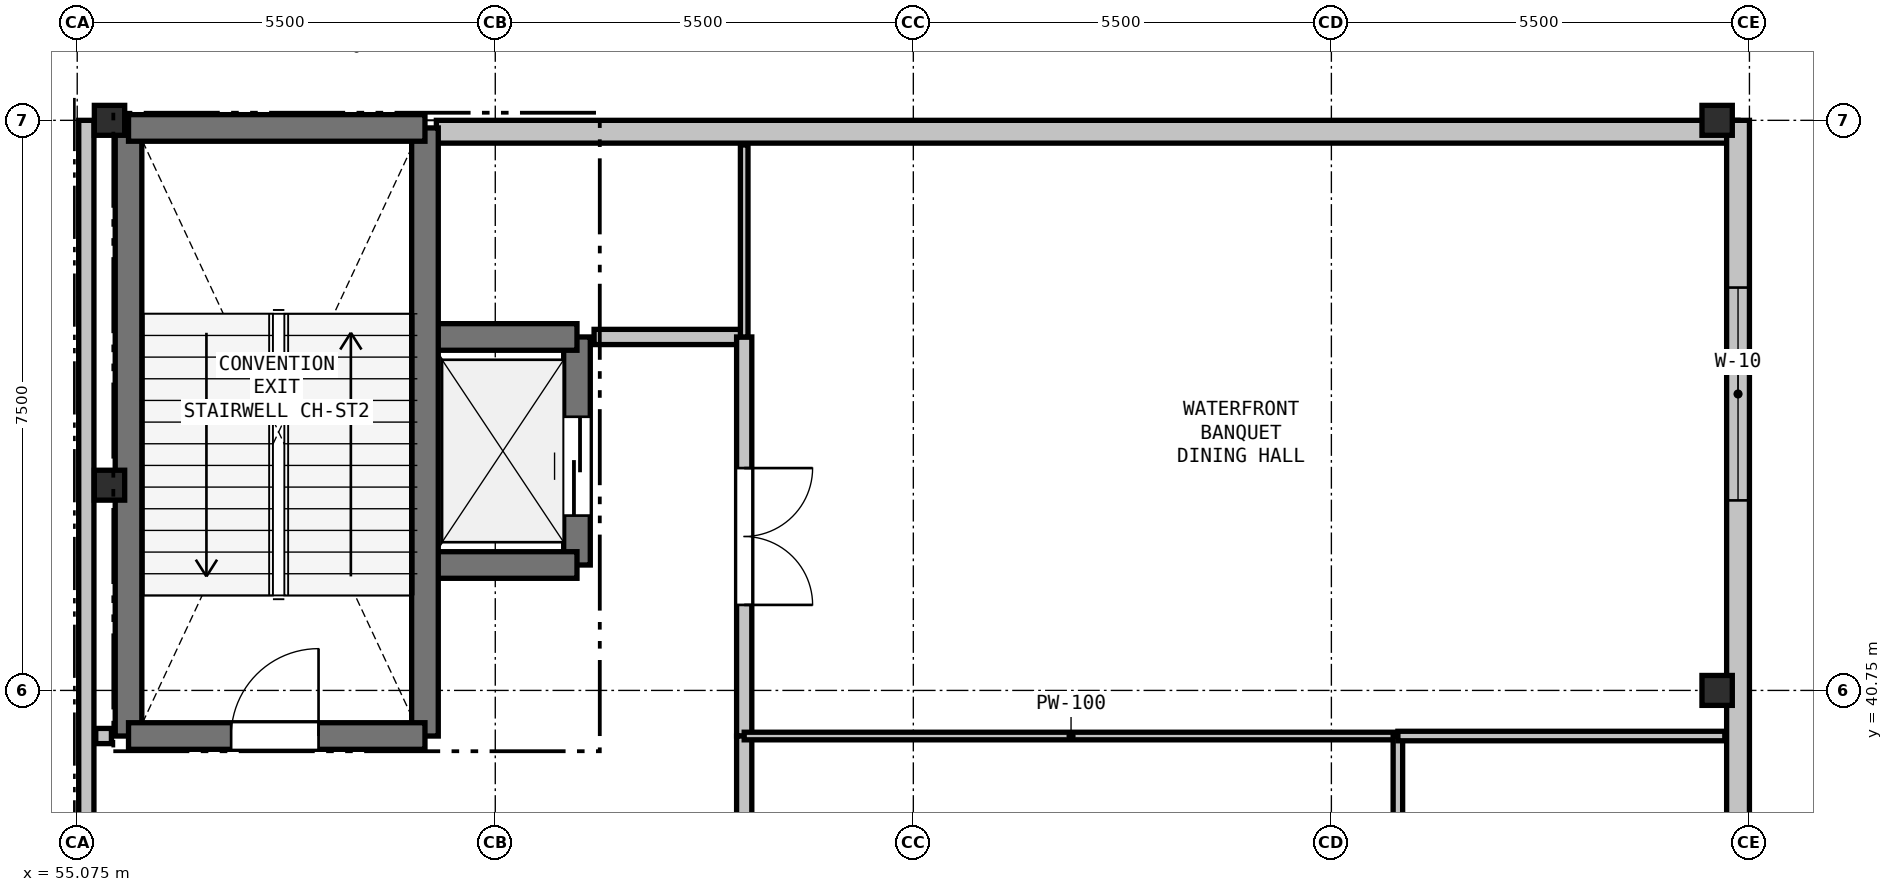
"""IFC4 building model, lengths in metres.
Left out: names, types, materials, properties, quantities, classifications, styles, units other than length and angle.
Written with IfcOpenShell. Run it as: python <this file> out.ifc"""

import sys

from ifc_helpers import new_model, si_unit, direction, frame, frame_2d, origin, origin_2d, place, context, subcontext, project, spatial, rectangle, i_section, extrude, element, fill, save


model = new_model("IFC4")
c1 = context("Model", 3, precision=1e-05, world=origin(), true_north=direction((0.0, 1.0)))
c2 = subcontext(c1, "Body", "Model", "MODEL_VIEW")
j1 = project(units=[si_unit("LENGTHUNIT", "METRE"), si_unit("PLANEANGLEUNIT", "RADIAN")], contexts=[c1])
p1 = place(None, origin())
s1 = spatial("IfcSite", under=j1, at=p1, CompositionType="ELEMENT")
p2 = place(p1, origin())
s2 = spatial("IfcBuilding", under=s1, at=p2, CompositionType="ELEMENT")
p3 = place(p2, frame((0.0, 0.0, 9.6)))
s3 = spatial("IfcBuildingStorey", under=s2, at=p3, CompositionType="ELEMENT", Elevation=9.6)
for number, where, z_axis, x_axis in (
    (1, (55.5, 43.45, 0.0), (0.0, 0.0, 1.0), (1.0, 0.0, 0.0)),
    (2, (55.5, 48.25, 0.0), (0.0, 0.0, 1.0), (1.0, 0.0, 0.0)),
    (3, (76.65, 40.75, 0.0), (0.0, 0.0, 1.0), (1.0, 0.0, 0.0)),
    (4, (76.65, 48.25, 0.0), (0.0, 0.0, 1.0), (1.0, 0.0, 0.0)),
):
    element("IfcColumn", number, at=place(p3, frame(where, z_axis=z_axis, x_axis=x_axis)), inside=s3, PredefinedType="COLUMN", context=c2, shape_type="SweptSolid", body=[
        extrude(i_section(OverallWidth=0.399, OverallDepth=0.394, WebThickness=0.023, FlangeThickness=0.037, at=origin_2d()), origin(), (0.0, 0.0, 1.0), 4.8),
    ])
p4 = place(p3, frame((55.195, 38.8, 0.0), z_axis=(0.0, 0.0, 1.0), x_axis=(0.0, 1.0, 0.0)))
e5 = element("IfcWall", 5, at=p4, inside=s3, PredefinedType="PARAPET", context=c2, shape_type="SweptSolid", body=[
    extrude(rectangle(XDim=9.45, YDim=0.2, at=frame_2d((4.725, 0.0))), origin(), (0.0, 0.0, 1.0), 4.09),
])
p5 = place(p3, frame((59.8, 48.1, 0.0), z_axis=(0.0, 0.0, 1.0), x_axis=(1.0, 0.0, 0.0)))
e6 = element("IfcWall", 6, at=p5, inside=s3, PredefinedType="SOLIDWALL", context=c2, shape_type="SweptSolid", body=[
    extrude(rectangle(XDim=17.125, YDim=0.3, at=frame_2d((8.562, 0.0))), origin(), (0.0, 0.0, 1.0), 3.614),
])
p6 = place(p3, frame((76.925, 48.25, 0.0), z_axis=(0.0, 0.0, 1.0), x_axis=(0.0, -1.0, 0.0)))
e7 = element("IfcWall", 7, at=p6, inside=s3, PredefinedType="SOLIDWALL", context=c2, shape_type="SweptSolid", body=[
    extrude(rectangle(XDim=9.35, YDim=0.3, at=frame_2d((4.675, 0.0))), origin(), (0.0, 0.0, 1.0), 4.09),
])
p7 = place(p6, frame((2.2, 0.0, 0.9)))
e8 = element("IfcOpeningElement", 8, at=p7, cuts=e7, PredefinedType="OPENING", context=c2, shape_type="SweptSolid", body=[
    extrude(rectangle(XDim=2.8, YDim=2.4, at=frame_2d((1.4, 1.2))), frame((0.0, 0.16, 0.0), z_axis=(0.0, -1.0, 0.0), x_axis=(1.0, 0.0, 0.0)), (0.0, 0.0, 1.0), 0.32),
])
p8 = place(p3, frame((61.65, 42.4, 0.0), z_axis=(0.0, 0.0, 1.0), x_axis=(0.0, 1.0, 0.0)))
e9 = element("IfcWall", 9, at=p8, inside=s3, PredefinedType="SHEAR", context=c2, shape_type="SweptSolid", body=[
    extrude(rectangle(XDim=3.0, YDim=0.35, at=frame_2d((1.5, 0.0))), origin(), (0.0, 0.0, 1.0), 4.48),
])
p9 = place(p8, frame((0.65, 0.0, 0.0)))
e10 = element("IfcOpeningElement", 10, at=p9, cuts=e9, PredefinedType="OPENING", context=c2, shape_type="SweptSolid", body=[
    extrude(rectangle(XDim=1.3, YDim=2.2, at=frame_2d((0.65, 1.1))), frame((0.0, 0.185, 0.0), z_axis=(0.0, -1.0, 0.0), x_axis=(1.0, 0.0, 0.0)), (0.0, 0.0, 1.0), 0.37),
])
for number, where, z_axis, x_axis in (
    (11, (59.65, 45.4, 0.0), (0.0, 0.0, 1.0), (1.0, 0.0, 0.0)),
    (12, (59.65, 42.4, 0.0), (0.0, 0.0, 1.0), (1.0, 0.0, 0.0)),
):
    element("IfcWall", number, at=place(p3, frame(where, z_axis=z_axis, x_axis=x_axis)), inside=s3, PredefinedType="SHEAR", context=c2, shape_type="SweptSolid", body=[
        extrude(rectangle(XDim=2.0, YDim=0.35, at=frame_2d((1.0, 0.0))), origin(), (0.0, 0.0, 1.0), 4.48),
    ])
for number, where, z_axis, x_axis in (
    (13, (59.65, 48.15, 0.0), (0.0, 0.0, 1.0), (0.0, -1.0, 0.0)),
    (14, (55.75, 40.15, 0.0), (0.0, 0.0, 1.0), (0.0, 1.0, 0.0)),
):
    element("IfcWall", number, at=place(p3, frame(where, z_axis=z_axis, x_axis=x_axis)), inside=s3, PredefinedType="SHEAR", context=c2, shape_type="SweptSolid", body=[
        extrude(rectangle(XDim=8.0, YDim=0.35, at=frame_2d((4.0, 0.0))), origin(), (0.0, 0.0, 1.0), 4.48),
    ])
p10 = place(p3, frame((55.75, 48.15, 0.0), z_axis=(0.0, 0.0, 1.0), x_axis=(1.0, 0.0, 0.0)))
e15 = element("IfcWall", 15, at=p10, inside=s3, PredefinedType="SHEAR", context=c2, shape_type="SweptSolid", body=[
    extrude(rectangle(XDim=3.9, YDim=0.35, at=frame_2d((1.95, 0.0))), origin(), (0.0, 0.0, 1.0), 4.48),
])
p11 = place(p3, frame((55.75, 40.15, 0.0), z_axis=(0.0, 0.0, 1.0), x_axis=(1.0, 0.0, 0.0)))
e16 = element("IfcWall", 16, at=p11, inside=s3, PredefinedType="SHEAR", context=c2, shape_type="SweptSolid", body=[
    extrude(rectangle(XDim=3.9, YDim=0.35, at=frame_2d((1.95, 0.0))), origin(), (0.0, 0.0, 1.0), 4.48),
])
p12 = place(p11, frame((1.35, 0.0, 0.0)))
e17 = element("IfcOpeningElement", 17, at=p12, cuts=e16, PredefinedType="OPENING", context=c2, shape_type="SweptSolid", body=[
    extrude(rectangle(XDim=1.15, YDim=2.15, at=frame_2d((0.575, 1.075))), frame((0.0, 0.185, 0.0), z_axis=(0.0, -1.0, 0.0), x_axis=(1.0, 0.0, 0.0)), (0.0, 0.0, 1.0), 0.37),
])
p13 = place(p3, frame((55.319, 40.15, 0.0), z_axis=(0.0, 0.0, 1.0), x_axis=(1.0, 0.0, 0.0)))
e18 = element("IfcWall", 18, at=p13, inside=s3, PredefinedType="PARTITIONING", context=c2, shape_type="SweptSolid", body=[
    extrude(rectangle(XDim=0.206, YDim=0.2, at=frame_2d((0.103, 0.0))), origin(), (0.0, 0.0, 1.0), 4.09),
])
p14 = place(p3, frame((61.875, 45.4, 0.0), z_axis=(0.0, 0.0, 1.0), x_axis=(1.0, 0.0, 0.0)))
e19 = element("IfcWall", 19, at=p14, inside=s3, PredefinedType="PARTITIONING", context=c2, shape_type="SweptSolid", body=[
    extrude(rectangle(XDim=1.975, YDim=0.2, at=frame_2d((0.988, 0.0))), origin(), (0.0, 0.0, 1.0), 4.055),
])
p15 = place(p3, frame((63.85, 45.4, 0.0), z_axis=(0.0, 0.0, 1.0), x_axis=(0.0, -1.0, 0.0)))
e20 = element("IfcWall", 20, at=p15, inside=s3, PredefinedType="PARTITIONING", context=c2, shape_type="SweptSolid", body=[
    extrude(rectangle(XDim=5.25, YDim=0.2, at=frame_2d((2.625, 0.0))), origin(), (0.0, 0.0, 1.0), 3.614),
])
p16 = place(p15, frame((1.725, 0.0, 0.0)))
e21 = element("IfcOpeningElement", 21, at=p16, cuts=e20, PredefinedType="OPENING", context=c2, shape_type="SweptSolid", body=[
    extrude(rectangle(XDim=1.8, YDim=2.2, at=frame_2d((0.9, 1.1))), frame((0.0, 0.11, 0.0), z_axis=(0.0, -1.0, 0.0), x_axis=(1.0, 0.0, 0.0)), (0.0, 0.0, 1.0), 0.22),
])
p17 = place(p3, frame((63.85, 40.15, 0.0), z_axis=(0.0, 0.0, 1.0), x_axis=(0.0, -1.0, 0.0)))
e22 = element("IfcWall", 22, at=p17, inside=s3, PredefinedType="PARTITIONING", context=c2, shape_type="SweptSolid", body=[
    extrude(rectangle(XDim=18.25, YDim=0.2, at=frame_2d((9.125, 0.0))), origin(), (0.0, 0.0, 1.0), 3.614),
])
p18 = place(p17, frame((8.225, 0.0, 0.0)))
e23 = element("IfcOpeningElement", 23, at=p18, cuts=e22, PredefinedType="OPENING", context=c2, shape_type="SweptSolid", body=[
    extrude(rectangle(XDim=1.8, YDim=2.2, at=frame_2d((0.9, 1.1))), frame((0.0, 0.11, 0.0), z_axis=(0.0, -1.0, 0.0), x_axis=(1.0, 0.0, 0.0)), (0.0, 0.0, 1.0), 0.22),
])
p19 = place(p3, frame((63.85, 40.15, 0.0), z_axis=(0.0, 0.0, 1.0), x_axis=(1.0, 0.0, 0.0)))
e24 = element("IfcWall", 24, at=p19, inside=s3, PredefinedType="PARTITIONING", context=c2, shape_type="SweptSolid", body=[
    extrude(rectangle(XDim=8.6, YDim=0.1, at=frame_2d((4.3, 0.0))), origin(), (0.0, 0.0, 1.0), 4.055),
])
p20 = place(p3, frame((72.45, 40.15, 0.0), z_axis=(0.0, 0.0, 1.0), x_axis=(0.0, -1.0, 0.0)))
e25 = element("IfcWall", 25, at=p20, inside=s3, PredefinedType="PARTITIONING", context=c2, shape_type="SweptSolid", body=[
    extrude(rectangle(XDim=10.025, YDim=0.125, at=frame_2d((5.012, 0.0))), origin(), (0.0, 0.0, 1.0), 3.614),
])
p21 = place(p3, frame((63.85, 45.4, 0.0), z_axis=(0.0, 0.0, 1.0), x_axis=(0.0, 1.0, 0.0)))
e26 = element("IfcWall", 26, at=p21, inside=s3, PredefinedType="PARTITIONING", context=c2, shape_type="SweptSolid", body=[
    extrude(rectangle(XDim=2.526, YDim=0.1, at=frame_2d((1.263, 0.0))), origin(), (0.0, 0.0, 1.0), 4.48),
])
p22 = place(p3, frame((76.751, 40.15, 0.0), z_axis=(0.0, 0.0, 1.0), x_axis=(-1.0, 0.0, 0.0)))
e27 = element("IfcWall", 27, at=p22, inside=s3, PredefinedType="PARTITIONING", context=c2, shape_type="SweptSolid", body=[
    extrude(rectangle(XDim=4.301, YDim=0.125, at=frame_2d((2.15, 0.0))), origin(), (0.0, 0.0, 1.0), 4.09),
])
p23 = place(p7, origin())
e28 = element("IfcWindow", 28, at=p23, inside=s3, PartitioningType="SINGLE_PANEL", PredefinedType="WINDOW", context=c2, shape_type="SweptSolid", body=[
    extrude(rectangle(XDim=2.8, YDim=2.4, at=frame_2d((1.4, 1.2))), frame((0.0, 0.03, 0.0), z_axis=(0.0, -1.0, 0.0), x_axis=(1.0, 0.0, 0.0)), (0.0, 0.0, 1.0), 0.06),
])
fill(e8, e28)
p24 = place(p9, origin())
e29 = element("IfcDoor", 29, at=p24, inside=s3, OperationType="SLIDING_TO_LEFT", PredefinedType="DOOR", context=c2, shape_type="SweptSolid", body=[
    extrude(rectangle(XDim=1.3, YDim=2.2, at=frame_2d((0.65, 1.1))), frame((0.0, 0.025, 0.0), z_axis=(0.0, -1.0, 0.0), x_axis=(1.0, 0.0, 0.0)), (0.0, 0.0, 1.0), 0.05),
])
fill(e10, e29)
p25 = place(p12, origin())
e30 = element("IfcDoor", 30, at=p25, inside=s3, OperationType="SINGLE_SWING_RIGHT", PredefinedType="DOOR", context=c2, shape_type="SweptSolid", body=[
    extrude(rectangle(XDim=1.15, YDim=2.15, at=frame_2d((0.575, 1.075))), frame((0.0, 0.025, 0.0), z_axis=(0.0, -1.0, 0.0), x_axis=(1.0, 0.0, 0.0)), (0.0, 0.0, 1.0), 0.05),
])
fill(e17, e30)
p26 = place(p16, origin())
e31 = element("IfcDoor", 31, at=p26, inside=s3, OperationType="DOUBLE_DOOR_SINGLE_SWING", PredefinedType="DOOR", context=c2, shape_type="SweptSolid", body=[
    extrude(rectangle(XDim=1.8, YDim=2.2, at=frame_2d((0.9, 1.1))), frame((0.0, 0.025, 0.0), z_axis=(0.0, -1.0, 0.0), x_axis=(1.0, 0.0, 0.0)), (0.0, 0.0, 1.0), 0.05),
])
fill(e21, e31)
save(model, sys.argv[1])
